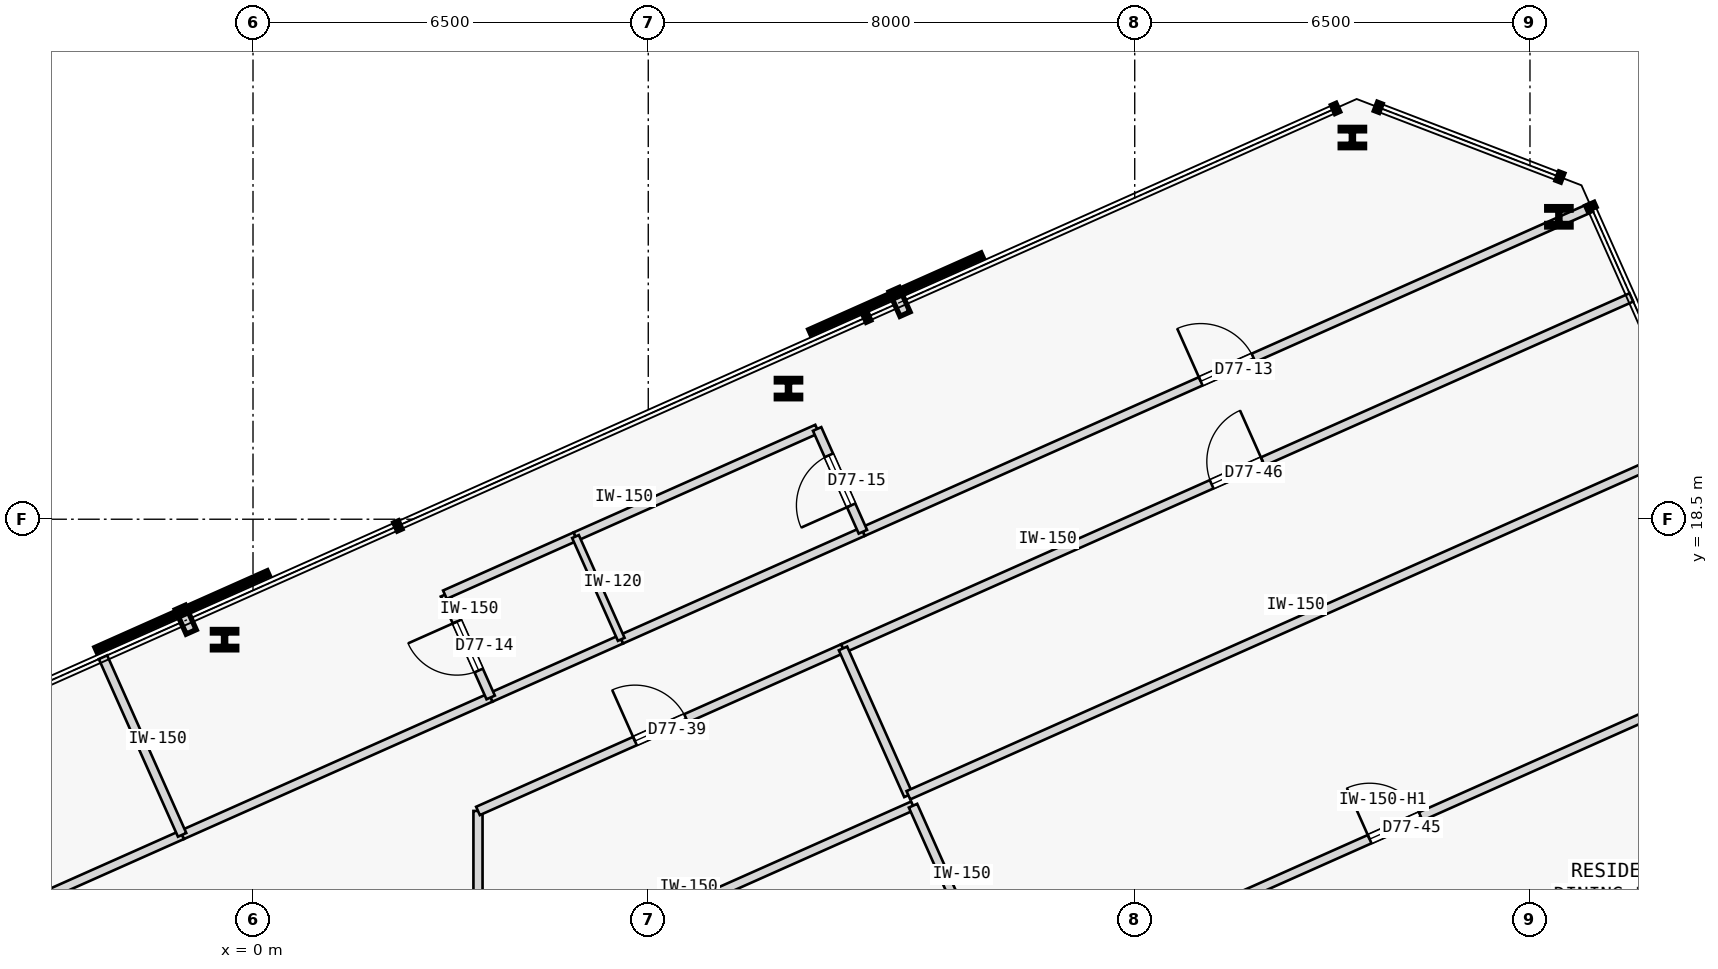
"""IFC4 building model, lengths in metres.
Left out: names, types, materials, properties, quantities, classifications, styles, units other than length and angle.
Written with IfcOpenShell. Run it as: python <this file> out.ifc"""

import sys

from ifc_helpers import new_model, si_unit, direction, frame, frame_2d, origin, origin_2d, place, context, subcontext, project, spatial, rectangle, i_section, extrude, element, fill, save


model = new_model("IFC4")
c1 = context("Model", 3, precision=1e-05, world=origin(), true_north=direction((0.0, 1.0)))
c2 = subcontext(c1, "Body", "Model", "MODEL_VIEW")
j1 = project(units=[si_unit("LENGTHUNIT", "METRE"), si_unit("PLANEANGLEUNIT", "RADIAN")], contexts=[c1])
p1 = place(None, origin())
s1 = spatial("IfcSite", under=j1, at=p1, CompositionType="ELEMENT")
p2 = place(p1, origin())
s2 = spatial("IfcBuilding", under=s1, at=p2, CompositionType="ELEMENT")
p3 = place(p2, frame((0.0, 0.0, 288.6)))
s3 = spatial("IfcBuildingStorey", under=s2, at=p3, CompositionType="ELEMENT", Elevation=288.6)
for number, where, z_axis, x_axis in (
    (1, (21.476, 23.473, 0.0), (0.0, 0.0, 1.0), (1.0, 0.0, 0.0)),
    (2, (18.08, 24.777, 0.0), (0.0, 0.0, 1.0), (1.0, 0.0, 0.0)),
    (3, (8.806, 20.648, 0.0), (0.0, 0.0, 1.0), (1.0, 0.0, 0.0)),
    (4, (-0.468, 16.519, 0.0), (0.0, 0.0, 1.0), (1.0, 0.0, 0.0)),
):
    element("IfcColumn", number, at=place(p3, frame(where, z_axis=z_axis, x_axis=x_axis)), inside=s3, PredefinedType="COLUMN", context=c2, shape_type="SweptSolid", body=[
        extrude(i_section(OverallWidth=0.401, OverallDepth=0.335, WebThickness=0.036, FlangeThickness=0.058, FilletRadius=0.015, at=origin_2d()), origin(), (0.0, 0.0, 1.0), 3.35),
    ])
p4 = place(p3, frame((-17.499, 6.038, 0.0), z_axis=(0.0, 0.0, 1.0), x_axis=(0.913541623157, 0.406745255362, 0.0)))
e5 = element("IfcWall", 5, at=p4, inside=s3, PredefinedType="PARTITIONING", context=c2, shape_type="SweptSolid", body=[
    extrude(rectangle(XDim=17.879, YDim=0.15, at=frame_2d((8.939, 0.0))), origin(), (0.0, 0.0, 1.0), 3.125),
])
p5 = place(p4, frame((8.465, 0.0, 0.0)))
e6 = element("IfcOpeningElement", 6, at=p5, cuts=e5, PredefinedType="OPENING", context=c2, shape_type="SweptSolid", body=[
    extrude(rectangle(XDim=0.95, YDim=2.15, at=frame_2d((0.475, 1.075))), frame((0.0, 0.085, 0.0), z_axis=(0.0, -1.0, 0.0), x_axis=(1.0, 0.0, 0.0)), (0.0, 0.0, 1.0), 0.17),
])
p6 = place(p3, frame((-1.166, 13.31, 0.0), z_axis=(0.0, 0.0, 1.0), x_axis=(0.913554005831, 0.406717442988, 0.0)))
e7 = element("IfcWall", 7, at=p6, inside=s3, PredefinedType="PARTITIONING", context=c2, shape_type="SweptSolid", body=[
    extrude(rectangle(XDim=5.555, YDim=0.15, at=frame_2d((2.777, 0.0))), origin(), (0.0, 0.0, 1.0), 3.125),
])
p7 = place(p3, frame((10.03, 18.294, 0.0), z_axis=(0.0, 0.0, 1.0), x_axis=(0.913545706015, 0.406736085222, 0.0)))
e8 = element("IfcWall", 8, at=p7, inside=s3, PredefinedType="PARTITIONING", context=c2, shape_type="SweptSolid", body=[
    extrude(rectangle(XDim=13.113, YDim=0.15, at=frame_2d((6.557, 0.0))), origin(), (0.0, 0.0, 1.0), 3.125),
])
p8 = place(p7, frame((6.082, 0.0, 0.0)))
e9 = element("IfcOpeningElement", 9, at=p8, cuts=e8, PredefinedType="OPENING", context=c2, shape_type="SweptSolid", body=[
    extrude(rectangle(XDim=0.95, YDim=2.15, at=frame_2d((0.475, 1.075))), frame((0.0, 0.085, 0.0), z_axis=(0.0, -1.0, 0.0), x_axis=(1.0, 0.0, 0.0)), (0.0, 0.0, 1.0), 0.17),
])
p9 = place(p3, frame((3.909, 15.569, 0.0), z_axis=(0.0, 0.0, 1.0), x_axis=(0.913541436194, 0.406745675276, 0.0)))
e10 = element("IfcWall", 10, at=p9, inside=s3, PredefinedType="PARTITIONING", context=c2, shape_type="SweptSolid", body=[
    extrude(rectangle(XDim=2.35, YDim=0.15, at=frame_2d((1.175, 0.0))), origin(), (0.0, 0.0, 1.0), 3.125),
])
p10 = place(p3, frame((6.055, 16.525, 0.0), z_axis=(0.0, 0.0, 1.0), x_axis=(0.913554477336, 0.406716383908, 0.0)))
e11 = element("IfcWall", 11, at=p10, inside=s3, PredefinedType="PARTITIONING", context=c2, shape_type="SweptSolid", body=[
    extrude(rectangle(XDim=4.35, YDim=0.15, at=frame_2d((2.175, 0.0))), origin(), (0.0, 0.0, 1.0), 3.125),
])
p11 = place(p3, frame((3.7, 10.604, 0.0), z_axis=(0.0, 0.0, 1.0), x_axis=(-0.000157567161, 0.999999987586, 0.0)))
e12 = element("IfcWall", 12, at=p11, inside=s3, PredefinedType="PARTITIONING", context=c2, shape_type="SweptSolid", body=[
    extrude(rectangle(XDim=3.099, YDim=0.15, at=frame_2d((1.549, 0.0))), origin(), (0.0, 0.0, 1.0), 2.675),
])
p12 = place(p3, frame((3.7, 13.703, 0.0), z_axis=(0.0, 0.0, 1.0), x_axis=(0.913549363376, 0.406727870542, 0.0)))
e13 = element("IfcWall", 13, at=p12, inside=s3, PredefinedType="PARTITIONING", context=c2, shape_type="SweptSolid", body=[
    extrude(rectangle(XDim=6.571, YDim=0.15, at=frame_2d((3.286, 0.0))), origin(), (0.0, 0.0, 1.0), 3.125),
])
p13 = place(p12, frame((2.825, 0.0, 0.0)))
e14 = element("IfcOpeningElement", 14, at=p13, cuts=e13, PredefinedType="OPENING", context=c2, shape_type="SweptSolid", body=[
    extrude(rectangle(XDim=0.92, YDim=2.15, at=frame_2d((0.46, 1.075))), frame((0.0, 0.085, 0.0), z_axis=(0.0, -1.0, 0.0), x_axis=(1.0, 0.0, 0.0)), (0.0, 0.0, 1.0), 0.17),
])
p14 = place(p3, frame((9.703, 16.375, 0.0), z_axis=(0.0, 0.0, 1.0), x_axis=(0.913544622417, 0.406738519018, 0.0)))
e15 = element("IfcWall", 15, at=p14, inside=s3, PredefinedType="PARTITIONING", context=c2, shape_type="SweptSolid", body=[
    extrude(rectangle(XDim=14.192, YDim=0.15, at=frame_2d((7.096, 0.0))), origin(), (0.0, 0.0, 1.0), 3.125),
])
p15 = place(p14, frame((6.636, 0.0, 0.0)))
e16 = element("IfcOpeningElement", 16, at=p15, cuts=e15, PredefinedType="OPENING", context=c2, shape_type="SweptSolid", body=[
    extrude(rectangle(XDim=0.92, YDim=2.15, at=frame_2d((0.46, 1.075))), frame((0.0, 0.085, 0.0), z_axis=(0.0, -1.0, 0.0), x_axis=(1.0, 0.0, 0.0)), (0.0, 0.0, 1.0), 0.17),
])
p16 = place(p3, frame((-1.166, 13.31, 0.0), z_axis=(0.0, 0.0, 1.0), x_axis=(-0.406761717745, 0.913534293268, 0.0)))
e17 = element("IfcWall", 17, at=p16, inside=s3, PredefinedType="PARTITIONING", context=c2, shape_type="SweptSolid", body=[
    extrude(rectangle(XDim=3.198, YDim=0.15, at=frame_2d((1.599, 0.0))), origin(), (0.0, 0.0, 1.0), 3.125),
])
p17 = place(p3, frame((3.909, 15.569, 0.0), z_axis=(0.0, 0.0, 1.0), x_axis=(-0.406701600856, 0.913561058639, 0.0)))
e18 = element("IfcWall", 18, at=p17, inside=s3, PredefinedType="PARTITIONING", context=c2, shape_type="SweptSolid", body=[
    extrude(rectangle(XDim=1.85, YDim=0.15, at=frame_2d((0.925, 0.0))), origin(), (0.0, 0.0, 1.0), 3.125),
])
p18 = place(p17, frame((0.485, 0.0, 0.0)))
e19 = element("IfcOpeningElement", 19, at=p18, cuts=e18, PredefinedType="OPENING", context=c2, shape_type="SweptSolid", body=[
    extrude(rectangle(XDim=0.88, YDim=2.15, at=frame_2d((0.44, 1.075))), frame((0.0, 0.085, 0.0), z_axis=(0.0, -1.0, 0.0), x_axis=(1.0, 0.0, 0.0)), (0.0, 0.0, 1.0), 0.17),
])
p19 = place(p3, frame((3.156, 17.259, 0.0), z_axis=(0.0, 0.0, 1.0), x_axis=(0.913541436194, 0.406745675276, 0.0)))
e20 = element("IfcWall", 20, at=p19, inside=s3, PredefinedType="PARTITIONING", context=c2, shape_type="SweptSolid", body=[
    extrude(rectangle(XDim=2.35, YDim=0.15, at=frame_2d((1.175, 0.0))), origin(), (0.0, 0.0, 1.0), 3.125),
])
p20 = place(p3, frame((5.303, 18.215, 0.0), z_axis=(0.0, 0.0, 1.0), x_axis=(0.913554477336, 0.406716383908, 0.0)))
e21 = element("IfcWall", 21, at=p20, inside=s3, PredefinedType="PARTITIONING", context=c2, shape_type="SweptSolid", body=[
    extrude(rectangle(XDim=4.35, YDim=0.15, at=frame_2d((2.175, 0.0))), origin(), (0.0, 0.0, 1.0), 3.125),
])
p21 = place(p3, frame((10.03, 18.294, 0.0), z_axis=(0.0, 0.0, 1.0), x_axis=(-0.406701600856, 0.913561058639, 0.0)))
e22 = element("IfcWall", 22, at=p21, inside=s3, PredefinedType="PARTITIONING", context=c2, shape_type="SweptSolid", body=[
    extrude(rectangle(XDim=1.85, YDim=0.15, at=frame_2d((0.925, 0.0))), origin(), (0.0, 0.0, 1.0), 3.125),
])
p22 = place(p21, frame((0.475, 0.0, 0.0)))
e23 = element("IfcOpeningElement", 23, at=p22, cuts=e22, PredefinedType="OPENING", context=c2, shape_type="SweptSolid", body=[
    extrude(rectangle(XDim=0.9, YDim=2.15, at=frame_2d((0.45, 1.075))), frame((0.0, 0.085, 0.0), z_axis=(0.0, -1.0, 0.0), x_axis=(1.0, 0.0, 0.0)), (0.0, 0.0, 1.0), 0.17),
])
p23 = place(p3, frame((6.055, 16.525, 0.0), z_axis=(0.0, 0.0, 1.0), x_axis=(-0.406701600856, 0.913561058639, 0.0)))
e24 = element("IfcWall", 24, at=p23, inside=s3, PredefinedType="PARTITIONING", context=c2, shape_type="SweptSolid", body=[
    extrude(rectangle(XDim=1.85, YDim=0.12, at=frame_2d((0.925, 0.0))), origin(), (0.0, 0.0, 1.0), 3.125),
])
p24 = place(p3, frame((3.7, 10.604, 0.0), z_axis=(0.0, 0.0, 1.0), x_axis=(0.913534926439, 0.406760295722, 0.0)))
e25 = element("IfcWall", 25, at=p24, inside=s3, PredefinedType="PARTITIONING", context=c2, shape_type="SweptSolid", body=[
    extrude(rectangle(XDim=7.831, YDim=0.15, at=frame_2d((3.916, 0.0))), origin(), (0.0, 0.0, 1.0), 3.125),
])
p25 = place(p3, frame((12.054, 11.095, 0.0), z_axis=(0.0, 0.0, 1.0), x_axis=(-0.406798922371, 0.91351772657, 0.0)))
e26 = element("IfcWall", 26, at=p25, inside=s3, PredefinedType="PARTITIONING", context=c2, shape_type="SweptSolid", body=[
    extrude(rectangle(XDim=2.949, YDim=0.15, at=frame_2d((1.475, 0.0))), origin(), (0.0, 0.0, 1.0), 3.125),
])
p26 = place(p3, frame((10.778, 13.961, 0.0), z_axis=(0.0, 0.0, 1.0), x_axis=(-0.406712614091, 0.913556155657, 0.0)))
e27 = element("IfcWall", 27, at=p26, inside=s3, PredefinedType="PARTITIONING", context=c2, shape_type="SweptSolid", body=[
    extrude(rectangle(XDim=2.643, YDim=0.15, at=frame_2d((1.322, 0.0))), origin(), (0.0, 0.0, 1.0), 3.125),
])
p27 = place(p3, frame((12.301, 10.54, 0.0), z_axis=(0.0, 0.0, 1.0), x_axis=(0.913544622417, 0.406738519018, 0.0)))
e28 = element("IfcWall", 28, at=p27, inside=s3, PredefinedType="PARTITIONING", context=c2, shape_type="SweptSolid", body=[
    extrude(rectangle(XDim=14.192, YDim=0.15, at=frame_2d((7.096, 0.0))), origin(), (0.0, 0.0, 1.0), 2.675),
])
p28 = place(p27, frame((6.636, 0.0, 0.0)))
e29 = element("IfcOpeningElement", 29, at=p28, cuts=e28, PredefinedType="OPENING", context=c2, shape_type="SweptSolid", body=[
    extrude(rectangle(XDim=0.92, YDim=2.15, at=frame_2d((0.46, 1.075))), frame((0.0, 0.085, 0.0), z_axis=(0.0, -1.0, 0.0), x_axis=(1.0, 0.0, 0.0)), (0.0, 0.0, 1.0), 0.17),
])
p29 = place(p3, frame((10.778, 13.961, 0.0), z_axis=(0.0, 0.0, 1.0), x_axis=(0.913544622417, 0.406738519018, 0.0)))
e30 = element("IfcWall", 30, at=p29, inside=s3, PredefinedType="PARTITIONING", context=c2, shape_type="SweptSolid", body=[
    extrude(rectangle(XDim=14.192, YDim=0.15, at=frame_2d((7.096, 0.0))), origin(), (0.0, 0.0, 1.0), 3.125),
])
p30 = place(p8, origin())
e31 = element("IfcDoor", 31, at=p30, inside=s3, OperationType="SINGLE_SWING_LEFT", PredefinedType="DOOR", context=c2, shape_type="SweptSolid", body=[
    extrude(rectangle(XDim=0.95, YDim=2.15, at=frame_2d((0.475, 1.075))), frame((0.0, 0.025, 0.0), z_axis=(0.0, -1.0, 0.0), x_axis=(1.0, 0.0, 0.0)), (0.0, 0.0, 1.0), 0.05),
])
fill(e9, e31)
p31 = place(p18, origin())
e32 = element("IfcDoor", 32, at=p31, inside=s3, OperationType="SINGLE_SWING_RIGHT", PredefinedType="DOOR", context=c2, shape_type="SweptSolid", body=[
    extrude(rectangle(XDim=0.88, YDim=2.15, at=frame_2d((0.44, 1.075))), frame((0.0, 0.025, 0.0), z_axis=(0.0, -1.0, 0.0), x_axis=(1.0, 0.0, 0.0)), (0.0, 0.0, 1.0), 0.05),
])
fill(e19, e32)
p32 = place(p22, origin())
e33 = element("IfcDoor", 33, at=p32, inside=s3, OperationType="SINGLE_SWING_LEFT", PredefinedType="DOOR", context=c2, shape_type="SweptSolid", body=[
    extrude(rectangle(XDim=0.9, YDim=2.15, at=frame_2d((0.45, 1.075))), frame((0.0, 0.025, 0.0), z_axis=(0.0, -1.0, 0.0), x_axis=(1.0, 0.0, 0.0)), (0.0, 0.0, 1.0), 0.05),
])
fill(e23, e33)
p33 = place(p13, origin())
e34 = element("IfcDoor", 34, at=p33, inside=s3, OperationType="SINGLE_SWING_LEFT", PredefinedType="DOOR", context=c2, shape_type="SweptSolid", body=[
    extrude(rectangle(XDim=0.92, YDim=2.15, at=frame_2d((0.46, 1.075))), frame((0.0, 0.025, 0.0), z_axis=(0.0, -1.0, 0.0), x_axis=(1.0, 0.0, 0.0)), (0.0, 0.0, 1.0), 0.05),
])
fill(e14, e34)
p34 = place(p28, origin())
e35 = element("IfcDoor", 35, at=p34, inside=s3, OperationType="SINGLE_SWING_LEFT", PredefinedType="DOOR", context=c2, shape_type="SweptSolid", body=[
    extrude(rectangle(XDim=0.92, YDim=2.15, at=frame_2d((0.46, 1.075))), frame((0.0, 0.025, 0.0), z_axis=(0.0, -1.0, 0.0), x_axis=(1.0, 0.0, 0.0)), (0.0, 0.0, 1.0), 0.05),
])
fill(e29, e35)
p35 = place(p15, origin())
e36 = element("IfcDoor", 36, at=p35, inside=s3, OperationType="SINGLE_SWING_RIGHT", PredefinedType="DOOR", context=c2, shape_type="SweptSolid", body=[
    extrude(rectangle(XDim=0.92, YDim=2.15, at=frame_2d((0.46, 1.075))), frame((0.0, 0.025, 0.0), z_axis=(0.0, -1.0, 0.0), x_axis=(1.0, 0.0, 0.0)), (0.0, 0.0, 1.0), 0.05),
])
fill(e16, e36)
save(model, sys.argv[1])
